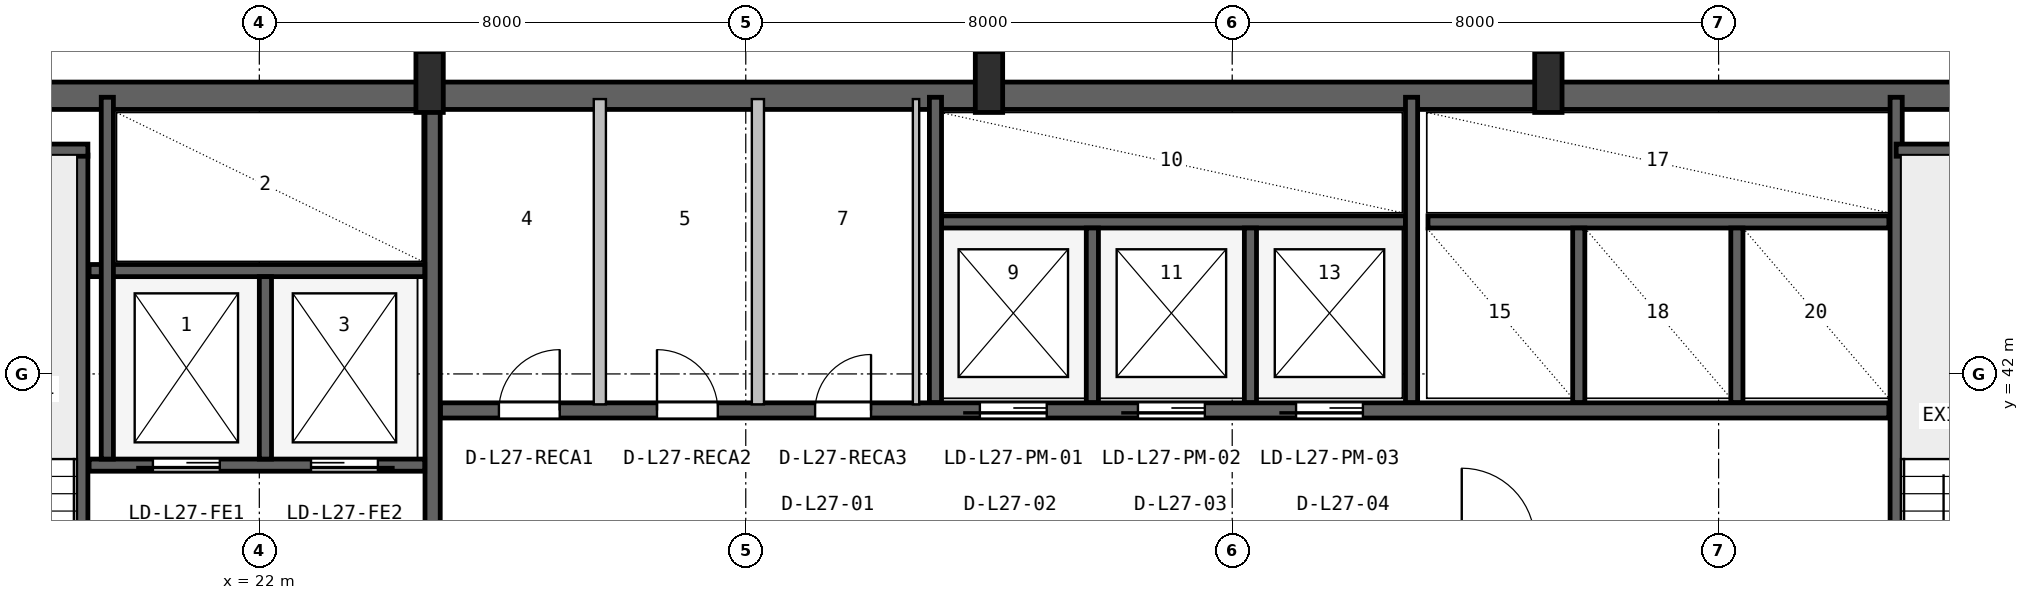
"""IFC4 building model, lengths in metres.
Left out: names, types, materials, properties, quantities, classifications, styles, units other than length and angle.
Written with IfcOpenShell. Run it as: python <this file> out.ifc"""

import sys

from ifc_helpers import new_model, si_unit, direction, frame, frame_2d, origin, origin_2d, place, context, subcontext, project, spatial, rectangle, i_section, extrude, source, transform, mapped, element, fill, save


model = new_model("IFC4")
c1 = context("Model", 3, precision=1e-05, world=origin(), true_north=direction((0.0, 1.0)))
c2 = subcontext(c1, "Body", "Model", "MODEL_VIEW")
j1 = project(units=[si_unit("LENGTHUNIT", "METRE"), si_unit("PLANEANGLEUNIT", "RADIAN")], contexts=[c1])
p1 = place(None, origin())
s1 = spatial("IfcSite", under=j1, at=p1, CompositionType="ELEMENT")
p2 = place(p1, origin())
s2 = spatial("IfcBuilding", under=s1, at=p2, CompositionType="ELEMENT")
p3 = place(p2, frame((0.0, 0.0, 114.4)))
s3 = spatial("IfcBuildingStorey", under=s2, at=p3, CompositionType="ELEMENT", Elevation=114.4)
p4 = place(p3, frame((15.6, 46.575, 0.0), z_axis=(0.0, 0.0, 1.0), x_axis=(1.0, 0.0, 0.0)))
e1 = element("IfcWall", 1, at=p4, inside=s3, PredefinedType="SHEAR", context=c2, shape_type="SweptSolid", body=[
    extrude(rectangle(XDim=36.8, YDim=0.45, at=frame_2d((18.4, 0.0))), origin(), (0.0, 0.0, 1.0), 3.55),
])
m1 = source(origin(), c2, "Body", "SweptSolid", [
    extrude(i_section(OverallWidth=0.45, OverallDepth=1.0, WebThickness=0.016, FlangeThickness=0.03, FilletRadius=0.016, at=origin_2d()), origin(), (0.0, 0.0, 1.0), 3.8),
])
for number, where, z_axis, x_axis in (
    (2, (24.8, 46.8, 0.0), (0.0, 0.0, 1.0), (1.0, 0.0, 0.0)),
    (3, (34.0, 46.8, 0.0), (0.0, 0.0, 1.0), (1.0, 0.0, 0.0)),
    (4, (43.2, 46.8, 0.0), (0.0, 0.0, 1.0), (1.0, 0.0, 0.0)),
):
    element("IfcColumn", number, at=place(p3, frame(where, z_axis=z_axis, x_axis=x_axis)), inside=s3, PredefinedType="COLUMN", context=c2, shape_type="MappedRepresentation", body=[
        mapped(m1, transform((0.0, 0.0, 0.0), x_axis=(1.0, 0.0, 0.0), y_axis=(0.0, 1.0, 0.0), z_axis=(0.0, 0.0, 1.0), scale=1.0)),
    ])
p5 = place(p3, frame((19.08, 35.95, 0.0), z_axis=(0.0, 0.0, 1.0), x_axis=(0.0, 1.0, 0.0)))
e5 = element("IfcWall", 5, at=p5, inside=s3, PredefinedType="SHEAR", context=c2, shape_type="SweptSolid", body=[
    extrude(rectangle(XDim=9.65, YDim=0.2, at=frame_2d((4.825, 0.0))), origin(), (0.0, 0.0, 1.0), 3.55),
])
p6 = place(p5, frame((0.25, 0.0, 0.0)))
e6 = element("IfcOpeningElement", 6, at=p6, cuts=e5, PredefinedType="OPENING", context=c2, shape_type="SweptSolid", body=[
    extrude(rectangle(XDim=0.95, YDim=2.1, at=frame_2d((0.475, 1.05))), frame((0.0, 0.11, 0.0), z_axis=(0.0, -1.0, 0.0), x_axis=(1.0, 0.0, 0.0)), (0.0, 0.0, 1.0), 0.22),
])
p7 = place(p3, frame((15.95, 45.68, 0.0), z_axis=(0.0, 0.0, 1.0), x_axis=(1.0, 0.0, 0.0)))
e7 = element("IfcWall", 7, at=p7, inside=s3, PredefinedType="SHEAR", context=c2, shape_type="SweptSolid", body=[
    extrude(rectangle(XDim=3.23, YDim=0.2, at=frame_2d((1.615, 0.0))), origin(), (0.0, 0.0, 1.0), 3.55),
])
p8 = place(p3, frame((24.85, 36.05, 0.0), z_axis=(0.0, 0.0, 1.0), x_axis=(0.0, 1.0, 0.0)))
e8 = element("IfcWall", 8, at=p8, inside=s3, PredefinedType="SHEAR", context=c2, shape_type="SweptSolid", body=[
    extrude(rectangle(XDim=10.45, YDim=0.25, at=frame_2d((5.225, 0.0))), origin(), (0.0, 0.0, 1.0), 3.55),
])
p9 = place(p3, frame((19.2, 40.5, 0.0), z_axis=(0.0, 0.0, 1.0), x_axis=(1.0, 0.0, 0.0)))
e9 = element("IfcWall", 9, at=p9, inside=s3, PredefinedType="SHEAR", context=c2, shape_type="SweptSolid", body=[
    extrude(rectangle(XDim=5.52, YDim=0.2, at=frame_2d((2.76, 0.0))), origin(), (0.0, 0.0, 1.0), 3.55),
])
p10 = place(p9, frame((1.05, 0.0, 0.0)))
e10 = element("IfcOpeningElement", 10, at=p10, cuts=e9, PredefinedType="OPENING", context=c2, shape_type="SweptSolid", body=[
    extrude(rectangle(XDim=1.1, YDim=2.18, at=frame_2d((0.55, 1.09))), frame((0.0, 0.11, 0.0), z_axis=(0.0, -1.0, 0.0), x_axis=(1.0, 0.0, 0.0)), (0.0, 0.0, 1.0), 0.22),
])
p11 = place(p9, frame((3.65, 0.0, 0.0)))
e11 = element("IfcOpeningElement", 11, at=p11, cuts=e9, PredefinedType="OPENING", context=c2, shape_type="SweptSolid", body=[
    extrude(rectangle(XDim=1.1, YDim=2.18, at=frame_2d((0.55, 1.09))), frame((0.0, 0.11, 0.0), z_axis=(0.0, -1.0, 0.0), x_axis=(1.0, 0.0, 0.0)), (0.0, 0.0, 1.0), 0.22),
])
p12 = place(p3, frame((19.2, 43.7, 0.0), z_axis=(0.0, 0.0, 1.0), x_axis=(1.0, 0.0, 0.0)))
e12 = element("IfcWall", 12, at=p12, inside=s3, PredefinedType="SHEAR", context=c2, shape_type="SweptSolid", body=[
    extrude(rectangle(XDim=5.52, YDim=0.2, at=frame_2d((2.76, 0.0))), origin(), (0.0, 0.0, 1.0), 3.55),
])
p13 = place(p3, frame((22.1, 40.6, 0.0), z_axis=(0.0, 0.0, 1.0), x_axis=(0.0, 1.0, 0.0)))
e13 = element("IfcWall", 13, at=p13, inside=s3, PredefinedType="SHEAR", context=c2, shape_type="SweptSolid", body=[
    extrude(rectangle(XDim=3.0, YDim=0.2, at=frame_2d((1.5, 0.0))), origin(), (0.0, 0.0, 1.0), 3.55),
])
p14 = place(p3, frame((19.5, 40.6, 0.0), z_axis=(0.0, 0.0, 1.0), x_axis=(0.0, 1.0, 0.0)))
e14 = element("IfcWall", 14, at=p14, inside=s3, PredefinedType="SHEAR", context=c2, shape_type="SweptSolid", body=[
    extrude(rectangle(XDim=5.95, YDim=0.2, at=frame_2d((2.975, 0.0))), origin(), (0.0, 0.0, 1.0), 3.55),
])
p15 = place(p3, frame((48.92, 36.05, 0.0), z_axis=(0.0, 0.0, 1.0), x_axis=(0.0, 1.0, 0.0)))
e15 = element("IfcWall", 15, at=p15, inside=s3, PredefinedType="SHEAR", context=c2, shape_type="SweptSolid", body=[
    extrude(rectangle(XDim=10.5, YDim=0.2, at=frame_2d((5.25, 0.0))), origin(), (0.0, 0.0, 1.0), 3.55),
])
p16 = place(p3, frame((48.92, 45.68, 0.0), z_axis=(0.0, 0.0, 1.0), x_axis=(1.0, 0.0, 0.0)))
e16 = element("IfcWall", 16, at=p16, inside=s3, PredefinedType="SHEAR", context=c2, shape_type="SweptSolid", body=[
    extrude(rectangle(XDim=3.18, YDim=0.2, at=frame_2d((1.59, 0.0))), origin(), (0.0, 0.0, 1.0), 3.55),
])
p17 = place(p3, frame((24.98, 41.4, 0.0), z_axis=(0.0, 0.0, 1.0), x_axis=(1.0, 0.0, 0.0)))
e17 = element("IfcWall", 17, at=p17, inside=s3, PredefinedType="SHEAR", context=c2, shape_type="SweptSolid", body=[
    extrude(rectangle(XDim=23.82, YDim=0.25, at=frame_2d((11.91, 0.0))), origin(), (0.0, 0.0, 1.0), 3.55),
])
p18 = place(p17, frame((8.87, 0.0, 0.0)))
e18 = element("IfcOpeningElement", 18, at=p18, cuts=e17, PredefinedType="OPENING", context=c2, shape_type="SweptSolid", body=[
    extrude(rectangle(XDim=1.1, YDim=2.18, at=frame_2d((0.55, 1.09))), frame((0.0, 0.135, 0.0), z_axis=(0.0, -1.0, 0.0), x_axis=(1.0, 0.0, 0.0)), (0.0, 0.0, 1.0), 0.27),
])
p19 = place(p17, frame((11.47, 0.0, 0.0)))
e19 = element("IfcOpeningElement", 19, at=p19, cuts=e17, PredefinedType="OPENING", context=c2, shape_type="SweptSolid", body=[
    extrude(rectangle(XDim=1.1, YDim=2.18, at=frame_2d((0.55, 1.09))), frame((0.0, 0.135, 0.0), z_axis=(0.0, -1.0, 0.0), x_axis=(1.0, 0.0, 0.0)), (0.0, 0.0, 1.0), 0.27),
])
p20 = place(p17, frame((14.07, 0.0, 0.0)))
e20 = element("IfcOpeningElement", 20, at=p20, cuts=e17, PredefinedType="OPENING", context=c2, shape_type="SweptSolid", body=[
    extrude(rectangle(XDim=1.1, YDim=2.18, at=frame_2d((0.55, 1.09))), frame((0.0, 0.135, 0.0), z_axis=(0.0, -1.0, 0.0), x_axis=(1.0, 0.0, 0.0)), (0.0, 0.0, 1.0), 0.27),
])
p21 = place(p17, frame((0.96, 0.0, 0.0)))
e21 = element("IfcOpeningElement", 21, at=p21, cuts=e17, PredefinedType="OPENING", context=c2, shape_type="SweptSolid", body=[
    extrude(rectangle(XDim=1.0, YDim=2.08, at=frame_2d((0.5, 1.04))), frame((0.0, 0.135, 0.0), z_axis=(0.0, -1.0, 0.0), x_axis=(1.0, 0.0, 0.0)), (0.0, 0.0, 1.0), 0.27),
])
p22 = place(p17, frame((3.56, 0.0, 0.0)))
e22 = element("IfcOpeningElement", 22, at=p22, cuts=e17, PredefinedType="OPENING", context=c2, shape_type="SweptSolid", body=[
    extrude(rectangle(XDim=1.0, YDim=2.08, at=frame_2d((0.5, 1.04))), frame((0.0, 0.135, 0.0), z_axis=(0.0, -1.0, 0.0), x_axis=(1.0, 0.0, 0.0)), (0.0, 0.0, 1.0), 0.27),
])
p23 = place(p17, frame((6.16, 0.0, 0.0)))
e23 = element("IfcOpeningElement", 23, at=p23, cuts=e17, PredefinedType="OPENING", context=c2, shape_type="SweptSolid", body=[
    extrude(rectangle(XDim=0.92, YDim=2.08, at=frame_2d((0.46, 1.04))), frame((0.0, 0.135, 0.0), z_axis=(0.0, -1.0, 0.0), x_axis=(1.0, 0.0, 0.0)), (0.0, 0.0, 1.0), 0.27),
])
p24 = place(p3, frame((33.22, 44.5, 0.0), z_axis=(0.0, 0.0, 1.0), x_axis=(1.0, 0.0, 0.0)))
e24 = element("IfcWall", 24, at=p24, inside=s3, PredefinedType="SHEAR", context=c2, shape_type="SweptSolid", body=[
    extrude(rectangle(XDim=7.63, YDim=0.2, at=frame_2d((3.815, 0.0))), origin(), (0.0, 0.0, 1.0), 3.55),
])
p25 = place(p3, frame((33.12, 41.53, 0.0), z_axis=(0.0, 0.0, 1.0), x_axis=(0.0, 1.0, 0.0)))
e25 = element("IfcWall", 25, at=p25, inside=s3, PredefinedType="SHEAR", context=c2, shape_type="SweptSolid", body=[
    extrude(rectangle(XDim=5.02, YDim=0.2, at=frame_2d((2.51, 0.0))), origin(), (0.0, 0.0, 1.0), 3.55),
])
for number, where, z_axis, x_axis in (
    (26, (35.7, 41.53, 0.0), (0.0, 0.0, 1.0), (0.0, 1.0, 0.0)),
    (27, (38.3, 41.53, 0.0), (0.0, 0.0, 1.0), (0.0, 1.0, 0.0)),
):
    element("IfcWall", number, at=place(p3, frame(where, z_axis=z_axis, x_axis=x_axis)), inside=s3, PredefinedType="SHEAR", context=c2, shape_type="SweptSolid", body=[
        extrude(rectangle(XDim=2.87, YDim=0.2, at=frame_2d((1.435, 0.0))), origin(), (0.0, 0.0, 1.0), 3.55),
    ])
p26 = place(p3, frame((40.95, 41.53, 0.0), z_axis=(0.0, 0.0, 1.0), x_axis=(0.0, 1.0, 0.0)))
e28 = element("IfcWall", 28, at=p26, inside=s3, PredefinedType="SHEAR", context=c2, shape_type="SweptSolid", body=[
    extrude(rectangle(XDim=5.02, YDim=0.2, at=frame_2d((2.51, 0.0))), origin(), (0.0, 0.0, 1.0), 3.55),
])
p27 = place(p3, frame((41.22, 44.5, 0.0), z_axis=(0.0, 0.0, 1.0), x_axis=(1.0, 0.0, 0.0)))
e29 = element("IfcWall", 29, at=p27, inside=s3, PredefinedType="SHEAR", context=c2, shape_type="SweptSolid", body=[
    extrude(rectangle(XDim=7.58, YDim=0.2, at=frame_2d((3.79, 0.0))), origin(), (0.0, 0.0, 1.0), 3.55),
])
for number, where, z_axis, x_axis in (
    (30, (43.7, 41.53, 0.0), (0.0, 0.0, 1.0), (0.0, 1.0, 0.0)),
    (31, (46.3, 41.53, 0.0), (0.0, 0.0, 1.0), (0.0, 1.0, 0.0)),
):
    element("IfcWall", number, at=place(p3, frame(where, z_axis=z_axis, x_axis=x_axis)), inside=s3, PredefinedType="SHEAR", context=c2, shape_type="SweptSolid", body=[
        extrude(rectangle(XDim=2.87, YDim=0.2, at=frame_2d((1.435, 0.0))), origin(), (0.0, 0.0, 1.0), 3.55),
    ])
for number, where, z_axis, x_axis in (
    (32, (27.6, 41.5, 0.0), (0.0, 0.0, 1.0), (0.0, 1.0, 0.0)),
    (33, (30.2, 41.5, 0.0), (0.0, 0.0, 1.0), (0.0, 1.0, 0.0)),
):
    element("IfcWall", number, at=place(p3, frame(where, z_axis=z_axis, x_axis=x_axis)), inside=s3, PredefinedType="SOLIDWALL", context=c2, shape_type="SweptSolid", body=[
        extrude(rectangle(XDim=5.02, YDim=0.2, at=frame_2d((2.51, 0.0))), origin(), (0.0, 0.0, 1.0), 3.53),
    ])
p28 = place(p3, frame((32.8, 41.5, 0.0), z_axis=(0.0, 0.0, 1.0), x_axis=(0.0, 1.0, 0.0)))
e34 = element("IfcWall", 34, at=p28, inside=s3, PredefinedType="PARTITIONING", context=c2, shape_type="SweptSolid", body=[
    extrude(rectangle(XDim=5.02, YDim=0.105, at=frame_2d((2.51, 0.0))), origin(), (0.0, 0.0, 1.0), 3.53),
])
m2 = source(origin(), c2, "Body", "SweptSolid", [
    extrude(rectangle(XDim=1.1, YDim=2.18, at=frame_2d((0.55, 1.09))), frame((0.0, 0.025, 0.0), z_axis=(0.0, -1.0, 0.0), x_axis=(1.0, 0.0, 0.0)), (0.0, 0.0, 1.0), 0.05),
])
p29 = place(p10, frame((1.1, 0.0, 0.0), z_axis=(0.0, 0.0, 1.0), x_axis=(-1.0, 0.0, 0.0)))
e35 = element("IfcDoor", 35, at=p29, inside=s3, OperationType="SLIDING_TO_LEFT", PredefinedType="DOOR", context=c2, shape_type="MappedRepresentation", body=[
    mapped(m2, transform((0.0, 0.0, 0.0), x_axis=(1.0, 0.0, 0.0), y_axis=(0.0, 1.0, 0.0), z_axis=(0.0, 0.0, 1.0), scale=1.0)),
])
fill(e10, e35)
p30 = place(p11, frame((1.1, 0.0, 0.0), z_axis=(0.0, 0.0, 1.0), x_axis=(-1.0, 0.0, 0.0)))
e36 = element("IfcDoor", 36, at=p30, inside=s3, OperationType="SLIDING_TO_RIGHT", PredefinedType="DOOR", context=c2, shape_type="MappedRepresentation", body=[
    mapped(m2, transform((0.0, 0.0, 0.0), x_axis=(1.0, 0.0, 0.0), y_axis=(0.0, 1.0, 0.0), z_axis=(0.0, 0.0, 1.0), scale=1.0)),
])
fill(e11, e36)
p31 = place(p18, frame((1.1, 0.0, 0.0), z_axis=(0.0, 0.0, 1.0), x_axis=(-1.0, 0.0, 0.0)))
e37 = element("IfcDoor", 37, at=p31, inside=s3, OperationType="SLIDING_TO_LEFT", PredefinedType="DOOR", context=c2, shape_type="MappedRepresentation", body=[
    mapped(m2, transform((0.0, 0.0, 0.0), x_axis=(1.0, 0.0, 0.0), y_axis=(0.0, 1.0, 0.0), z_axis=(0.0, 0.0, 1.0), scale=1.0)),
])
fill(e18, e37)
p32 = place(p19, frame((1.1, 0.0, 0.0), z_axis=(0.0, 0.0, 1.0), x_axis=(-1.0, 0.0, 0.0)))
e38 = element("IfcDoor", 38, at=p32, inside=s3, OperationType="SLIDING_TO_LEFT", PredefinedType="DOOR", context=c2, shape_type="MappedRepresentation", body=[
    mapped(m2, transform((0.0, 0.0, 0.0), x_axis=(1.0, 0.0, 0.0), y_axis=(0.0, 1.0, 0.0), z_axis=(0.0, 0.0, 1.0), scale=1.0)),
])
fill(e19, e38)
p33 = place(p20, frame((1.1, 0.0, 0.0), z_axis=(0.0, 0.0, 1.0), x_axis=(-1.0, 0.0, 0.0)))
e39 = element("IfcDoor", 39, at=p33, inside=s3, OperationType="SLIDING_TO_LEFT", PredefinedType="DOOR", context=c2, shape_type="MappedRepresentation", body=[
    mapped(m2, transform((0.0, 0.0, 0.0), x_axis=(1.0, 0.0, 0.0), y_axis=(0.0, 1.0, 0.0), z_axis=(0.0, 0.0, 1.0), scale=1.0)),
])
fill(e20, e39)
m3 = source(origin(), c2, "Body", "SweptSolid", [
    extrude(rectangle(XDim=1.0, YDim=2.08, at=frame_2d((0.5, 1.04))), frame((0.0, 0.025, 0.0), z_axis=(0.0, -1.0, 0.0), x_axis=(1.0, 0.0, 0.0)), (0.0, 0.0, 1.0), 0.05),
])
p34 = place(p21, origin())
e40 = element("IfcDoor", 40, at=p34, inside=s3, OperationType="SINGLE_SWING_RIGHT", PredefinedType="DOOR", context=c2, shape_type="MappedRepresentation", body=[
    mapped(m3, transform((0.0, 0.0, 0.0), x_axis=(1.0, 0.0, 0.0), y_axis=(0.0, 1.0, 0.0), z_axis=(0.0, 0.0, 1.0), scale=1.0)),
])
fill(e21, e40)
p35 = place(p22, origin())
e41 = element("IfcDoor", 41, at=p35, inside=s3, OperationType="SINGLE_SWING_LEFT", PredefinedType="DOOR", context=c2, shape_type="MappedRepresentation", body=[
    mapped(m3, transform((0.0, 0.0, 0.0), x_axis=(1.0, 0.0, 0.0), y_axis=(0.0, 1.0, 0.0), z_axis=(0.0, 0.0, 1.0), scale=1.0)),
])
fill(e22, e41)
m4 = source(origin(), c2, "Body", "SweptSolid", [
    extrude(rectangle(XDim=0.92, YDim=2.08, at=frame_2d((0.46, 1.04))), frame((0.0, 0.025, 0.0), z_axis=(0.0, -1.0, 0.0), x_axis=(1.0, 0.0, 0.0)), (0.0, 0.0, 1.0), 0.05),
])
p36 = place(p23, origin())
e42 = element("IfcDoor", 42, at=p36, inside=s3, OperationType="SINGLE_SWING_RIGHT", PredefinedType="DOOR", context=c2, shape_type="MappedRepresentation", body=[
    mapped(m4, transform((0.0, 0.0, 0.0), x_axis=(1.0, 0.0, 0.0), y_axis=(0.0, 1.0, 0.0), z_axis=(0.0, 0.0, 1.0), scale=1.0)),
])
fill(e23, e42)
save(model, sys.argv[1])
